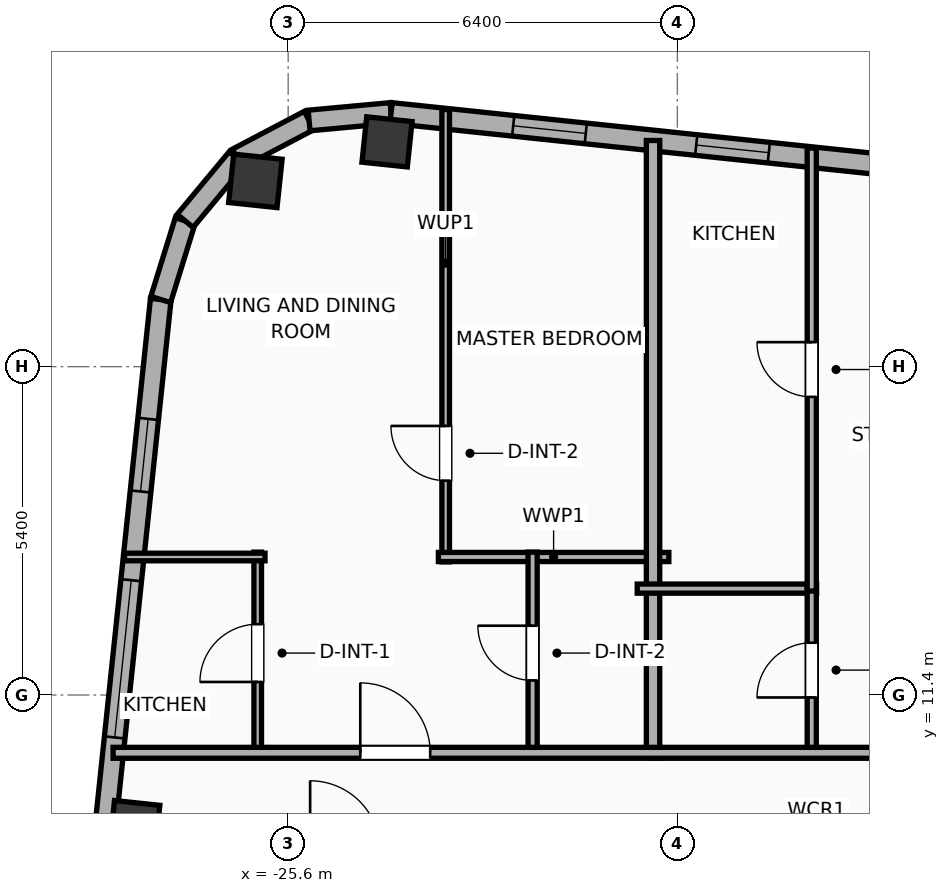
"""IFC4 building model, lengths in metres.
Left out: names, types, materials, properties, quantities, classifications, styles, units other than length and angle.
Written with IfcOpenShell. Run it as: python <this file> out.ifc"""

import sys

from ifc_helpers import new_model, si_unit, direction, frame, frame_2d, origin, origin_2d, place, context, subcontext, project, spatial, rectangle, hollow_rectangle, hollow_circle, extrude, element, fill, save


model = new_model("IFC4")
c1 = context("Model", 3, precision=1e-05, world=origin(), true_north=direction((0.0, 1.0)))
c2 = subcontext(c1, "Body", "Model", "MODEL_VIEW")
j1 = project(units=[si_unit("LENGTHUNIT", "METRE"), si_unit("PLANEANGLEUNIT", "RADIAN")], contexts=[c1])
p1 = place(None, origin())
s1 = spatial("IfcSite", under=j1, at=p1, CompositionType="ELEMENT")
p2 = place(p1, origin())
s2 = spatial("IfcBuilding", under=s1, at=p2, CompositionType="ELEMENT")
p3 = place(p2, frame((0.0, 0.0, 306.8)))
s3 = spatial("IfcBuildingStorey", under=s2, at=p3, CompositionType="ELEMENT", Elevation=306.8)
p4 = place(p3, frame((-23.975, 20.497, 0.0), z_axis=(0.0, 0.0, 1.0), x_axis=(0.994521895368, -0.104528463268, 0.0)))
e1 = element("IfcColumn", 1, at=p4, inside=s3, PredefinedType="COLUMN", context=c2, shape_type="SweptSolid", body=[
    extrude(hollow_rectangle(XDim=0.75, YDim=0.75, WallThickness=0.025, at=origin_2d()), origin(), (0.0, 0.0, 1.0), 3.865),
])
p5 = place(p3, frame((-26.139, 19.855, 0.0), z_axis=(0.0, 0.0, 1.0), x_axis=(0.994521895368, -0.104528463268, 0.0)))
e2 = element("IfcColumn", 2, at=p5, inside=s3, PredefinedType="COLUMN", context=c2, shape_type="SweptSolid", body=[
    extrude(hollow_circle(Radius=0.4, WallThickness=0.028, at=origin_2d()), origin(), (0.0, 0.0, 1.0), 3.865),
])
p6 = place(p3, frame((-28.123, 9.252, 0.0), z_axis=(0.0, 0.0, 1.0), x_axis=(0.994521895368, -0.104528463268, 0.0)))
e3 = element("IfcColumn", 3, at=p6, inside=s3, PredefinedType="COLUMN", context=c2, shape_type="SweptSolid", body=[
    extrude(hollow_rectangle(XDim=0.75, YDim=0.75, WallThickness=0.025, at=origin_2d()), origin(), (0.0, 0.0, 1.0), 3.865),
])
p7 = place(p3, frame((-30.87, -12.296, 0.0), z_axis=(0.0, 0.0, 1.0), x_axis=(0.104533282919, 0.994521388791, 0.0)))
e4 = element("IfcWall", 4, at=p7, inside=s3, PredefinedType="ELEMENTEDWALL", context=c2, shape_type="SweptSolid", body=[
    extrude(rectangle(XDim=30.366, YDim=0.34, at=frame_2d((15.183, 0.0))), origin(), (0.0, 0.0, 1.0), 2.39),
])
p8 = place(p7, frame((5.442, 0.0, 0.65)))
e5 = element("IfcOpeningElement", 5, at=p8, cuts=e4, PredefinedType="OPENING", context=c2, shape_type="SweptSolid", body=[
    extrude(rectangle(XDim=2.6, YDim=1.45, at=frame_2d((1.3, 0.725))), frame((0.0, 0.18, 0.0), z_axis=(0.0, -1.0, 0.0), x_axis=(1.0, 0.0, 0.0)), (0.0, 0.0, 1.0), 0.36),
])
p9 = place(p7, frame((23.125, 0.0, 0.65)))
e6 = element("IfcOpeningElement", 6, at=p9, cuts=e4, PredefinedType="OPENING", context=c2, shape_type="SweptSolid", body=[
    extrude(rectangle(XDim=2.6, YDim=1.45, at=frame_2d((1.3, 0.725))), frame((0.0, 0.18, 0.0), z_axis=(0.0, -1.0, 0.0), x_axis=(1.0, 0.0, 0.0)), (0.0, 0.0, 1.0), 0.36),
])
p10 = place(p7, frame((27.192, 0.0, 0.55)))
e7 = element("IfcOpeningElement", 7, at=p10, cuts=e4, PredefinedType="OPENING", context=c2, shape_type="SweptSolid", body=[
    extrude(rectangle(XDim=1.2, YDim=1.15, at=frame_2d((0.6, 0.575))), frame((0.0, 0.18, 0.0), z_axis=(0.0, -1.0, 0.0), x_axis=(1.0, 0.0, 0.0)), (0.0, 0.0, 1.0), 0.36),
])
p11 = place(p7, frame((16.311, 0.0, 0.55)))
e8 = element("IfcOpeningElement", 8, at=p11, cuts=e4, PredefinedType="OPENING", context=c2, shape_type="SweptSolid", body=[
    extrude(rectangle(XDim=1.2, YDim=1.15, at=frame_2d((0.6, 0.575))), frame((0.0, 0.18, 0.0), z_axis=(0.0, -1.0, 0.0), x_axis=(1.0, 0.0, 0.0)), (0.0, 0.0, 1.0), 0.36),
])
p12 = place(p3, frame((-27.696, 17.905, 0.0), z_axis=(0.0, 0.0, 1.0), x_axis=(0.296416228123, 0.955058856671, 0.0)))
e9 = element("IfcWall", 9, at=p12, inside=s3, PredefinedType="ELEMENTEDWALL", context=c2, shape_type="SweptSolid", body=[
    extrude(rectangle(XDim=1.354, YDim=0.34, at=frame_2d((0.677, 0.0))), origin(), (0.0, 0.0, 1.0), 3.5),
])
p13 = place(p3, frame((-27.294, 19.198, 0.0), z_axis=(0.0, 0.0, 1.0), x_axis=(0.639501603217, 0.768789762863, 0.0)))
e10 = element("IfcWall", 10, at=p13, inside=s3, PredefinedType="ELEMENTEDWALL", context=c2, shape_type="SweptSolid", body=[
    extrude(rectangle(XDim=1.337, YDim=0.34, at=frame_2d((0.668, 0.0))), origin(), (0.0, 0.0, 1.0), 3.5),
])
p14 = place(p3, frame((-26.439, 20.226, 0.0), z_axis=(0.0, 0.0, 1.0), x_axis=(0.884922182678, 0.465738908193, 0.0)))
e11 = element("IfcWall", 11, at=p14, inside=s3, PredefinedType="ELEMENTEDWALL", context=c2, shape_type="SweptSolid", body=[
    extrude(rectangle(XDim=1.337, YDim=0.34, at=frame_2d((0.668, 0.0))), origin(), (0.0, 0.0, 1.0), 2.39),
])
p15 = place(p3, frame((-25.256, 20.848, 0.0), z_axis=(0.0, 0.0, 1.0), x_axis=(0.995813013343, 0.091413579172, 0.0)))
e12 = element("IfcWall", 12, at=p15, inside=s3, PredefinedType="ELEMENTEDWALL", context=c2, shape_type="SweptSolid", body=[
    extrude(rectangle(XDim=1.354, YDim=0.34, at=frame_2d((0.677, 0.0))), origin(), (0.0, 0.0, 1.0), 2.39),
])
p16 = place(p3, frame((-23.908, 20.972, 0.0), z_axis=(0.0, 0.0, 1.0), x_axis=(0.994521888554, -0.104528528102, 0.0)))
e13 = element("IfcWall", 13, at=p16, inside=s3, PredefinedType="ELEMENTEDWALL", context=c2, shape_type="SweptSolid", body=[
    extrude(rectangle(XDim=46.766, YDim=0.34, at=frame_2d((23.383, 0.0))), origin(), (0.0, 0.0, 1.0), 2.39),
])
p17 = place(p16, frame((23.733, 0.0, 0.65)))
e14 = element("IfcOpeningElement", 14, at=p17, cuts=e13, PredefinedType="OPENING", context=c2, shape_type="SweptSolid", body=[
    extrude(rectangle(XDim=2.6, YDim=1.45, at=frame_2d((1.3, 0.725))), frame((0.0, 0.18, 0.0), z_axis=(0.0, -1.0, 0.0), x_axis=(1.0, 0.0, 0.0)), (0.0, 0.0, 1.0), 0.36),
])
p18 = place(p16, frame((38.522, 0.0, 0.65)))
e15 = element("IfcOpeningElement", 15, at=p18, cuts=e13, PredefinedType="OPENING", context=c2, shape_type="SweptSolid", body=[
    extrude(rectangle(XDim=2.6, YDim=1.45, at=frame_2d((1.3, 0.725))), frame((0.0, 0.18, 0.0), z_axis=(0.0, -1.0, 0.0), x_axis=(1.0, 0.0, 0.0)), (0.0, 0.0, 1.0), 0.36),
])
p19 = place(p16, frame((2.019, 0.0, 0.55)))
e16 = element("IfcOpeningElement", 16, at=p19, cuts=e13, PredefinedType="OPENING", context=c2, shape_type="SweptSolid", body=[
    extrude(rectangle(XDim=1.2, YDim=1.15, at=frame_2d((0.6, 0.575))), frame((0.0, 0.18, 0.0), z_axis=(0.0, -1.0, 0.0), x_axis=(1.0, 0.0, 0.0)), (0.0, 0.0, 1.0), 0.36),
])
p20 = place(p16, frame((9.966, 0.0, 0.55)))
e17 = element("IfcOpeningElement", 17, at=p20, cuts=e13, PredefinedType="OPENING", context=c2, shape_type="SweptSolid", body=[
    extrude(rectangle(XDim=1.2, YDim=1.15, at=frame_2d((0.6, 0.575))), frame((0.0, 0.18, 0.0), z_axis=(0.0, -1.0, 0.0), x_axis=(1.0, 0.0, 0.0)), (0.0, 0.0, 1.0), 0.36),
])
p21 = place(p16, frame((5.046, 0.0, 0.55)))
e18 = element("IfcOpeningElement", 18, at=p21, cuts=e13, PredefinedType="OPENING", context=c2, shape_type="SweptSolid", body=[
    extrude(rectangle(XDim=1.2, YDim=1.15, at=frame_2d((0.6, 0.575))), frame((0.0, 0.18, 0.0), z_axis=(0.0, -1.0, 0.0), x_axis=(1.0, 0.0, 0.0)), (0.0, 0.0, 1.0), 0.36),
])
p22 = place(p16, frame((16.207, 0.0, 0.55)))
e19 = element("IfcOpeningElement", 19, at=p22, cuts=e13, PredefinedType="OPENING", context=c2, shape_type="SweptSolid", body=[
    extrude(rectangle(XDim=1.2, YDim=1.15, at=frame_2d((0.6, 0.575))), frame((0.0, 0.18, 0.0), z_axis=(0.0, -1.0, 0.0), x_axis=(1.0, 0.0, 0.0)), (0.0, 0.0, 1.0), 0.36),
])
p23 = place(p16, frame((12.487, 0.0, 0.55)))
e20 = element("IfcOpeningElement", 20, at=p23, cuts=e13, PredefinedType="OPENING", context=c2, shape_type="SweptSolid", body=[
    extrude(rectangle(XDim=1.2, YDim=1.15, at=frame_2d((0.6, 0.575))), frame((0.0, 0.18, 0.0), z_axis=(0.0, -1.0, 0.0), x_axis=(1.0, 0.0, 0.0)), (0.0, 0.0, 1.0), 0.36),
])
p24 = place(p16, frame((20.621, 0.0, 0.55)))
e21 = element("IfcOpeningElement", 21, at=p24, cuts=e13, PredefinedType="OPENING", context=c2, shape_type="SweptSolid", body=[
    extrude(rectangle(XDim=1.2, YDim=1.15, at=frame_2d((0.6, 0.575))), frame((0.0, 0.18, 0.0), z_axis=(0.0, -1.0, 0.0), x_axis=(1.0, 0.0, 0.0)), (0.0, 0.0, 1.0), 0.36),
])
p25 = place(p16, frame((28.704, 0.0, 0.55)))
e22 = element("IfcOpeningElement", 22, at=p25, cuts=e13, PredefinedType="OPENING", context=c2, shape_type="SweptSolid", body=[
    extrude(rectangle(XDim=1.2, YDim=1.15, at=frame_2d((0.6, 0.575))), frame((0.0, 0.18, 0.0), z_axis=(0.0, -1.0, 0.0), x_axis=(1.0, 0.0, 0.0)), (0.0, 0.0, 1.0), 0.36),
])
p26 = place(p16, frame((32.185, 0.0, 0.55)))
e23 = element("IfcOpeningElement", 23, at=p26, cuts=e13, PredefinedType="OPENING", context=c2, shape_type="SweptSolid", body=[
    extrude(rectangle(XDim=1.2, YDim=1.15, at=frame_2d((0.6, 0.575))), frame((0.0, 0.18, 0.0), z_axis=(0.0, -1.0, 0.0), x_axis=(1.0, 0.0, 0.0)), (0.0, 0.0, 1.0), 0.36),
])
p27 = place(p16, frame((35.503, 0.0, 0.55)))
e24 = element("IfcOpeningElement", 24, at=p27, cuts=e13, PredefinedType="OPENING", context=c2, shape_type="SweptSolid", body=[
    extrude(rectangle(XDim=1.2, YDim=1.15, at=frame_2d((0.6, 0.575))), frame((0.0, 0.18, 0.0), z_axis=(0.0, -1.0, 0.0), x_axis=(1.0, 0.0, 0.0)), (0.0, 0.0, 1.0), 0.36),
])
p28 = place(p16, frame((43.106, 0.0, 0.55)))
e25 = element("IfcOpeningElement", 25, at=p28, cuts=e13, PredefinedType="OPENING", context=c2, shape_type="SweptSolid", body=[
    extrude(rectangle(XDim=1.2, YDim=1.15, at=frame_2d((0.6, 0.575))), frame((0.0, 0.18, 0.0), z_axis=(0.0, -1.0, 0.0), x_axis=(1.0, 0.0, 0.0)), (0.0, 0.0, 1.0), 0.36),
])
p29 = place(p3, frame((-23.01, 13.59, 0.0), z_axis=(0.0, 0.0, 1.0), x_axis=(0.0, 1.0, 0.0)))
e26 = element("IfcWall", 26, at=p29, inside=s3, PredefinedType="PARTITIONING", context=c2, shape_type="SweptSolid", body=[
    extrude(rectangle(XDim=7.438, YDim=0.125, at=frame_2d((3.719, 0.0))), origin(), (0.0, 0.0, 1.0), 2.39),
])
p30 = place(p29, frame((1.335, 0.0, 0.0)))
e27 = element("IfcOpeningElement", 27, at=p30, cuts=e26, PredefinedType="OPENING", context=c2, shape_type="SweptSolid", body=[
    extrude(rectangle(XDim=0.9, YDim=2.05, at=frame_2d((0.45, 1.025))), frame((0.0, 0.073, 0.0), z_axis=(0.0, -1.0, 0.0), x_axis=(1.0, 0.0, 0.0)), (0.0, 0.0, 1.0), 0.145),
])
p31 = place(p3, frame((-23.13, 13.67, 0.0), z_axis=(0.0, 0.0, 1.0), x_axis=(1.0, 0.0, 0.0)))
e28 = element("IfcWall", 28, at=p31, inside=s3, PredefinedType="PLUMBINGWALL", context=c2, shape_type="SweptSolid", body=[
    extrude(rectangle(XDim=3.79, YDim=0.15, at=frame_2d((1.895, 0.0))), origin(), (0.0, 0.0, 1.0), 3.5),
])
p32 = place(p3, frame((-26.101, 10.43, 0.0), z_axis=(0.0, 0.0, 1.0), x_axis=(0.0, 1.0, 0.0)))
e29 = element("IfcWall", 29, at=p32, inside=s3, PredefinedType="PARTITIONING", context=c2, shape_type="SweptSolid", body=[
    extrude(rectangle(XDim=3.32, YDim=0.125, at=frame_2d((1.66, 0.0))), origin(), (0.0, 0.0, 1.0), 3.5),
])
p33 = place(p32, frame((1.185, 0.0, 0.0)))
e30 = element("IfcOpeningElement", 30, at=p33, cuts=e29, PredefinedType="OPENING", context=c2, shape_type="SweptSolid", body=[
    extrude(rectangle(XDim=0.95, YDim=2.05, at=frame_2d((0.475, 1.025))), frame((0.0, 0.073, 0.0), z_axis=(0.0, -1.0, 0.0), x_axis=(1.0, 0.0, 0.0)), (0.0, 0.0, 1.0), 0.145),
])
p34 = place(p3, frame((-28.292, 13.67, 0.0), z_axis=(0.0, 0.0, 1.0), x_axis=(1.0, 0.0, 0.0)))
e31 = element("IfcWall", 31, at=p34, inside=s3, PredefinedType="PARTITIONING", context=c2, shape_type="SweptSolid", body=[
    extrude(rectangle(XDim=2.311, YDim=0.125, at=frame_2d((1.155, 0.0))), origin(), (0.0, 0.0, 1.0), 3.5),
])
p35 = place(p3, frame((-21.58, 10.43, 0.0), z_axis=(0.0, 0.0, 1.0), x_axis=(0.0, 1.0, 0.0)))
e32 = element("IfcWall", 32, at=p35, inside=s3, PredefinedType="PLUMBINGWALL", context=c2, shape_type="SweptSolid", body=[
    extrude(rectangle(XDim=3.32, YDim=0.15, at=frame_2d((1.66, 0.0))), origin(), (0.0, 0.0, 1.0), 2.39),
])
p36 = place(p35, frame((1.21, 0.0, 0.0)))
e33 = element("IfcOpeningElement", 33, at=p36, cuts=e32, PredefinedType="OPENING", context=c2, shape_type="SweptSolid", body=[
    extrude(rectangle(XDim=0.9, YDim=2.05, at=frame_2d((0.45, 1.025))), frame((0.0, 0.085, 0.0), z_axis=(0.0, -1.0, 0.0), x_axis=(1.0, 0.0, 0.0)), (0.0, 0.0, 1.0), 0.17),
])
p37 = place(p3, frame((-19.6, 10.37, 0.0), z_axis=(0.0, 0.0, 1.0), x_axis=(0.0, 1.0, 0.0)))
e34 = element("IfcWall", 34, at=p37, inside=s3, PredefinedType="PARTITIONING", context=c2, shape_type="SweptSolid", body=[
    extrude(rectangle(XDim=10.149, YDim=0.22, at=frame_2d((5.075, 0.0))), origin(), (0.0, 0.0, 1.0), 3.5),
])
p38 = place(p3, frame((-19.86, 13.15, 0.0), z_axis=(0.0, 0.0, 1.0), x_axis=(1.0, 0.0, 0.0)))
e35 = element("IfcWall", 35, at=p38, inside=s3, PredefinedType="PLUMBINGWALL", context=c2, shape_type="SweptSolid", body=[
    extrude(rectangle(XDim=2.95, YDim=0.15, at=frame_2d((1.475, 0.0))), origin(), (0.0, 0.0, 1.0), 3.5),
])
p39 = place(p3, frame((-16.99, 10.43, 0.0), z_axis=(0.0, 0.0, 1.0), x_axis=(0.0, 1.0, 0.0)))
e36 = element("IfcWall", 36, at=p39, inside=s3, PredefinedType="PLUMBINGWALL", context=c2, shape_type="SweptSolid", body=[
    extrude(rectangle(XDim=2.76, YDim=0.15, at=frame_2d((1.38, 0.0))), origin(), (0.0, 0.0, 1.0), 3.5),
])
p40 = place(p39, frame((0.93, 0.0, 0.0)))
e37 = element("IfcOpeningElement", 37, at=p40, cuts=e36, PredefinedType="OPENING", context=c2, shape_type="SweptSolid", body=[
    extrude(rectangle(XDim=0.9, YDim=2.05, at=frame_2d((0.45, 1.025))), frame((0.0, 0.085, 0.0), z_axis=(0.0, -1.0, 0.0), x_axis=(1.0, 0.0, 0.0)), (0.0, 0.0, 1.0), 0.17),
])
p41 = place(p3, frame((-16.99, 13.11, 0.0), z_axis=(0.0, 0.0, 1.0), x_axis=(0.0, 1.0, 0.0)))
e38 = element("IfcWall", 38, at=p41, inside=s3, PredefinedType="PLUMBINGWALL", context=c2, shape_type="SweptSolid", body=[
    extrude(rectangle(XDim=7.286, YDim=0.15, at=frame_2d((3.643, 0.0))), origin(), (0.0, 0.0, 1.0), 3.5),
])
p42 = place(p41, frame((3.193, 0.0, 0.0)))
e39 = element("IfcOpeningElement", 39, at=p42, cuts=e38, PredefinedType="OPENING", context=c2, shape_type="SweptSolid", body=[
    extrude(rectangle(XDim=0.9, YDim=2.05, at=frame_2d((0.45, 1.025))), frame((0.0, 0.085, 0.0), z_axis=(0.0, -1.0, 0.0), x_axis=(1.0, 0.0, 0.0)), (0.0, 0.0, 1.0), 0.17),
])
p43 = place(p3, frame((-28.479, 10.45, 0.0), z_axis=(0.0, 0.0, 1.0), x_axis=(1.0, 0.0, 0.0)))
e40 = element("IfcWall", 40, at=p43, inside=s3, PredefinedType="PARTITIONING", context=c2, shape_type="SweptSolid", body=[
    extrude(rectangle(XDim=53.956, YDim=0.18, at=frame_2d((26.978, 0.0))), origin(), (0.0, 0.0, 1.0), 3.5),
])
p44 = place(p43, frame((4.065, 0.0, 0.0)))
e41 = element("IfcOpeningElement", 41, at=p44, cuts=e40, PredefinedType="OPENING", context=c2, shape_type="SweptSolid", body=[
    extrude(rectangle(XDim=1.15, YDim=2.05, at=frame_2d((0.575, 1.025))), frame((0.0, 0.1, 0.0), z_axis=(0.0, -1.0, 0.0), x_axis=(1.0, 0.0, 0.0)), (0.0, 0.0, 1.0), 0.2),
])
p45 = place(p43, frame((13.281, 0.0, 0.0)))
e42 = element("IfcOpeningElement", 42, at=p45, cuts=e40, PredefinedType="OPENING", context=c2, shape_type="SweptSolid", body=[
    extrude(rectangle(XDim=1.15, YDim=2.05, at=frame_2d((0.575, 1.025))), frame((0.0, 0.1, 0.0), z_axis=(0.0, -1.0, 0.0), x_axis=(1.0, 0.0, 0.0)), (0.0, 0.0, 1.0), 0.2),
])
p46 = place(p43, frame((20.678, 0.0, 0.0)))
e43 = element("IfcOpeningElement", 43, at=p46, cuts=e40, PredefinedType="OPENING", context=c2, shape_type="SweptSolid", body=[
    extrude(rectangle(XDim=1.15, YDim=2.05, at=frame_2d((0.575, 1.025))), frame((0.0, 0.1, 0.0), z_axis=(0.0, -1.0, 0.0), x_axis=(1.0, 0.0, 0.0)), (0.0, 0.0, 1.0), 0.2),
])
p47 = place(p43, frame((26.969, 0.0, 0.0)))
e44 = element("IfcOpeningElement", 44, at=p47, cuts=e40, PredefinedType="OPENING", context=c2, shape_type="SweptSolid", body=[
    extrude(rectangle(XDim=1.15, YDim=2.05, at=frame_2d((0.575, 1.025))), frame((0.0, 0.1, 0.0), z_axis=(0.0, -1.0, 0.0), x_axis=(1.0, 0.0, 0.0)), (0.0, 0.0, 1.0), 0.2),
])
p48 = place(p43, frame((32.931, 0.0, 0.0)))
e45 = element("IfcOpeningElement", 45, at=p48, cuts=e40, PredefinedType="OPENING", context=c2, shape_type="SweptSolid", body=[
    extrude(rectangle(XDim=1.15, YDim=2.05, at=frame_2d((0.575, 1.025))), frame((0.0, 0.1, 0.0), z_axis=(0.0, -1.0, 0.0), x_axis=(1.0, 0.0, 0.0)), (0.0, 0.0, 1.0), 0.2),
])
p49 = place(p43, frame((41.769, 0.0, 0.0)))
e46 = element("IfcOpeningElement", 46, at=p49, cuts=e40, PredefinedType="OPENING", context=c2, shape_type="SweptSolid", body=[
    extrude(rectangle(XDim=1.15, YDim=2.05, at=frame_2d((0.575, 1.025))), frame((0.0, 0.1, 0.0), z_axis=(0.0, -1.0, 0.0), x_axis=(1.0, 0.0, 0.0)), (0.0, 0.0, 1.0), 0.2),
])
p50 = place(p43, frame((49.761, 0.0, 0.0)))
e47 = element("IfcOpeningElement", 47, at=p50, cuts=e40, PredefinedType="OPENING", context=c2, shape_type="SweptSolid", body=[
    extrude(rectangle(XDim=0.9, YDim=2.05, at=frame_2d((0.45, 1.025))), frame((0.0, 0.1, 0.0), z_axis=(0.0, -1.0, 0.0), x_axis=(1.0, 0.0, 0.0)), (0.0, 0.0, 1.0), 0.2),
])
p51 = place(p9, origin())
e48 = element("IfcWindow", 48, at=p51, inside=s3, PartitioningType="SINGLE_PANEL", PredefinedType="WINDOW", context=c2, shape_type="SweptSolid", body=[
    extrude(rectangle(XDim=2.6, YDim=1.45, at=frame_2d((1.3, 0.725))), frame((0.0, 0.03, 0.0), z_axis=(0.0, -1.0, 0.0), x_axis=(1.0, 0.0, 0.0)), (0.0, 0.0, 1.0), 0.06),
])
fill(e6, e48)
p52 = place(p10, origin())
e49 = element("IfcWindow", 49, at=p52, inside=s3, PartitioningType="SINGLE_PANEL", PredefinedType="WINDOW", context=c2, shape_type="SweptSolid", body=[
    extrude(rectangle(XDim=1.2, YDim=1.15, at=frame_2d((0.6, 0.575))), frame((0.0, 0.03, 0.0), z_axis=(0.0, -1.0, 0.0), x_axis=(1.0, 0.0, 0.0)), (0.0, 0.0, 1.0), 0.06),
])
fill(e7, e49)
p53 = place(p19, origin())
e50 = element("IfcWindow", 50, at=p53, inside=s3, PartitioningType="SINGLE_PANEL", PredefinedType="WINDOW", context=c2, shape_type="SweptSolid", body=[
    extrude(rectangle(XDim=1.2, YDim=1.15, at=frame_2d((0.6, 0.575))), frame((0.0, 0.03, 0.0), z_axis=(0.0, -1.0, 0.0), x_axis=(1.0, 0.0, 0.0)), (0.0, 0.0, 1.0), 0.06),
])
fill(e16, e50)
p54 = place(p21, origin())
e51 = element("IfcWindow", 51, at=p54, inside=s3, PartitioningType="SINGLE_PANEL", PredefinedType="WINDOW", context=c2, shape_type="SweptSolid", body=[
    extrude(rectangle(XDim=1.2, YDim=1.15, at=frame_2d((0.6, 0.575))), frame((0.0, 0.03, 0.0), z_axis=(0.0, -1.0, 0.0), x_axis=(1.0, 0.0, 0.0)), (0.0, 0.0, 1.0), 0.06),
])
fill(e18, e51)
p55 = place(p30, origin())
e52 = element("IfcDoor", 52, at=p55, inside=s3, OperationType="SINGLE_SWING_RIGHT", PredefinedType="DOOR", context=c2, shape_type="SweptSolid", body=[
    extrude(rectangle(XDim=0.9, YDim=2.05, at=frame_2d((0.45, 1.025))), frame((0.0, 0.025, 0.0), z_axis=(0.0, -1.0, 0.0), x_axis=(1.0, 0.0, 0.0)), (0.0, 0.0, 1.0), 0.05),
])
fill(e27, e52)
p56 = place(p33, origin())
e53 = element("IfcDoor", 53, at=p56, inside=s3, OperationType="SINGLE_SWING_LEFT", PredefinedType="DOOR", context=c2, shape_type="SweptSolid", body=[
    extrude(rectangle(XDim=0.95, YDim=2.05, at=frame_2d((0.475, 1.025))), frame((0.0, 0.025, 0.0), z_axis=(0.0, -1.0, 0.0), x_axis=(1.0, 0.0, 0.0)), (0.0, 0.0, 1.0), 0.05),
])
fill(e30, e53)
p57 = place(p36, origin())
e54 = element("IfcDoor", 54, at=p57, inside=s3, OperationType="SINGLE_SWING_RIGHT", PredefinedType="DOOR", context=c2, shape_type="SweptSolid", body=[
    extrude(rectangle(XDim=0.9, YDim=2.05, at=frame_2d((0.45, 1.025))), frame((0.0, 0.025, 0.0), z_axis=(0.0, -1.0, 0.0), x_axis=(1.0, 0.0, 0.0)), (0.0, 0.0, 1.0), 0.05),
])
fill(e33, e54)
p58 = place(p40, origin())
e55 = element("IfcDoor", 55, at=p58, inside=s3, OperationType="SINGLE_SWING_LEFT", PredefinedType="DOOR", context=c2, shape_type="SweptSolid", body=[
    extrude(rectangle(XDim=0.9, YDim=2.05, at=frame_2d((0.45, 1.025))), frame((0.0, 0.025, 0.0), z_axis=(0.0, -1.0, 0.0), x_axis=(1.0, 0.0, 0.0)), (0.0, 0.0, 1.0), 0.05),
])
fill(e37, e55)
p59 = place(p42, origin())
e56 = element("IfcDoor", 56, at=p59, inside=s3, OperationType="SINGLE_SWING_RIGHT", PredefinedType="DOOR", context=c2, shape_type="SweptSolid", body=[
    extrude(rectangle(XDim=0.9, YDim=2.05, at=frame_2d((0.45, 1.025))), frame((0.0, 0.025, 0.0), z_axis=(0.0, -1.0, 0.0), x_axis=(1.0, 0.0, 0.0)), (0.0, 0.0, 1.0), 0.05),
])
fill(e39, e56)
p60 = place(p44, origin())
e57 = element("IfcDoor", 57, at=p60, inside=s3, OperationType="SINGLE_SWING_LEFT", PredefinedType="DOOR", context=c2, shape_type="SweptSolid", body=[
    extrude(rectangle(XDim=1.15, YDim=2.05, at=frame_2d((0.575, 1.025))), frame((0.0, 0.025, 0.0), z_axis=(0.0, -1.0, 0.0), x_axis=(1.0, 0.0, 0.0)), (0.0, 0.0, 1.0), 0.05),
])
fill(e41, e57)
save(model, sys.argv[1])
